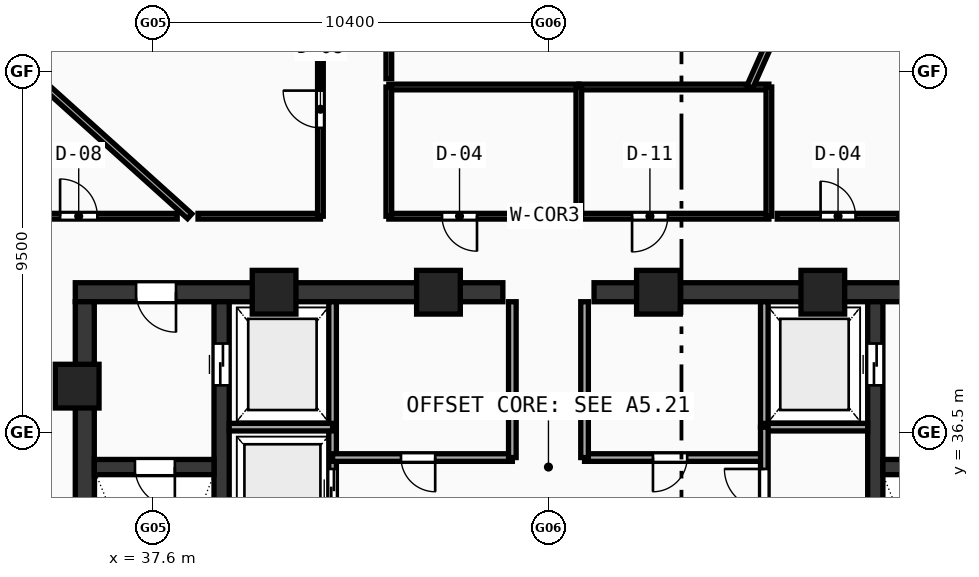
"""IFC4 building model, lengths in metres.
Left out: names, types, materials, properties, quantities, classifications, styles, units other than length and angle.
Written with IfcOpenShell. Run it as: python <this file> out.ifc"""

import sys

from ifc_helpers import new_model, si_unit, direction, frame, frame_2d, origin, origin_with_axes, origin_2d, place, context, subcontext, project, spatial, rectangle, hollow_rectangle, extrude, source, transform, mapped, element, fill, save


model = new_model("IFC4")
c1 = context("Model", 3, precision=1e-05, world=origin(), true_north=direction((0.0, 1.0)))
c2 = subcontext(c1, "Body", "Model", "MODEL_VIEW")
j1 = project(units=[si_unit("LENGTHUNIT", "METRE"), si_unit("PLANEANGLEUNIT", "RADIAN")], contexts=[c1])
p1 = place(None, origin())
s1 = spatial("IfcSite", under=j1, at=p1, CompositionType="ELEMENT")
p2 = place(p1, origin())
s2 = spatial("IfcBuilding", under=s1, at=p2, CompositionType="ELEMENT")
p3 = place(p2, frame((0.0, 0.0, 336.76)))
s3 = spatial("IfcBuildingStorey", under=s2, at=p3, CompositionType="ELEMENT", Elevation=336.76)
p4 = place(p3, frame((35.55, 40.2, 0.0), z_axis=(0.0, 0.0, 1.0), x_axis=(1.0, 0.0, 0.0)))
e1 = element("IfcWall", 1, at=p4, inside=s3, PredefinedType="SHEAR", context=c2, shape_type="SweptSolid", body=[
    extrude(rectangle(XDim=11.25, YDim=0.5, at=frame_2d((5.625, 0.0))), origin(), (0.0, 0.0, 1.0), 3.49),
])
p5 = place(p4, frame((1.6, 0.0, 0.0)))
e2 = element("IfcOpeningElement", 2, at=p5, cuts=e1, PredefinedType="OPENING", context=c2, shape_type="SweptSolid", body=[
    extrude(rectangle(XDim=1.05, YDim=2.1, at=frame_2d((0.525, 1.05))), frame((0.0, 0.26, 0.0), z_axis=(0.0, -1.0, 0.0), x_axis=(1.0, 0.0, 0.0)), (0.0, 0.0, 1.0), 0.52),
])
p6 = place(p3, frame((49.2, 40.2, 0.0), z_axis=(0.0, 0.0, 1.0), x_axis=(1.0, 0.0, 0.0)))
e3 = element("IfcWall", 3, at=p6, inside=s3, PredefinedType="SHEAR", context=c2, shape_type="SweptSolid", body=[
    extrude(rectangle(XDim=11.25, YDim=0.5, at=frame_2d((5.625, 0.0))), origin(), (0.0, 0.0, 1.0), 3.49),
])
p7 = place(p6, frame((8.6, 0.0, 0.0)))
e4 = element("IfcOpeningElement", 4, at=p7, cuts=e3, PredefinedType="OPENING", context=c2, shape_type="SweptSolid", body=[
    extrude(rectangle(XDim=1.05, YDim=2.1, at=frame_2d((0.525, 1.05))), frame((0.0, 0.26, 0.0), z_axis=(0.0, -1.0, 0.0), x_axis=(1.0, 0.0, 0.0)), (0.0, 0.0, 1.0), 0.52),
])
p8 = place(p3, frame((35.8, 27.75, 0.0), z_axis=(0.0, 0.0, 1.0), x_axis=(0.0, 1.0, 0.0)))
e5 = element("IfcWall", 5, at=p8, inside=s3, PredefinedType="SHEAR", context=c2, shape_type="SweptSolid", body=[
    extrude(rectangle(XDim=12.2, YDim=0.5, at=frame_2d((6.1, 0.0))), origin(), (0.0, 0.0, 1.0), 3.49),
])
p9 = place(p3, frame((39.4, 27.75, 0.0), z_axis=(0.0, 0.0, 1.0), x_axis=(0.0, 1.0, 0.0)))
e6 = element("IfcWall", 6, at=p9, inside=s3, PredefinedType="SHEAR", context=c2, shape_type="SweptSolid", body=[
    extrude(rectangle(XDim=12.2, YDim=0.4, at=frame_2d((6.1, 0.0))), origin(), (0.0, 0.0, 1.0), 3.49),
])
p10 = place(p9, frame((10.0, 0.0, 0.0)))
e7 = element("IfcOpeningElement", 7, at=p10, cuts=e6, PredefinedType="OPENING", context=c2, shape_type="SweptSolid", body=[
    extrude(rectangle(XDim=1.1, YDim=2.1, at=frame_2d((0.55, 1.05))), frame((0.0, 0.21, 0.0), z_axis=(0.0, -1.0, 0.0), x_axis=(1.0, 0.0, 0.0)), (0.0, 0.0, 1.0), 0.42),
])
p11 = place(p3, frame((56.6, 27.75, 0.0), z_axis=(0.0, 0.0, 1.0), x_axis=(0.0, 1.0, 0.0)))
e8 = element("IfcWall", 8, at=p11, inside=s3, PredefinedType="SHEAR", context=c2, shape_type="SweptSolid", body=[
    extrude(rectangle(XDim=12.2, YDim=0.4, at=frame_2d((6.1, 0.0))), origin(), (0.0, 0.0, 1.0), 3.49),
])
p12 = place(p11, frame((10.0, 0.0, 0.0)))
e9 = element("IfcOpeningElement", 9, at=p12, cuts=e8, PredefinedType="OPENING", context=c2, shape_type="SweptSolid", body=[
    extrude(rectangle(XDim=1.1, YDim=2.1, at=frame_2d((0.55, 1.05))), frame((0.0, 0.21, 0.0), z_axis=(0.0, -1.0, 0.0), x_axis=(1.0, 0.0, 0.0)), (0.0, 0.0, 1.0), 0.42),
])
p13 = place(p3, frame((36.05, 35.6, 0.0), z_axis=(0.0, 0.0, 1.0), x_axis=(1.0, 0.0, 0.0)))
e10 = element("IfcWall", 10, at=p13, inside=s3, PredefinedType="SHEAR", context=c2, shape_type="SweptSolid", body=[
    extrude(rectangle(XDim=3.15, YDim=0.4, at=frame_2d((1.575, 0.0))), origin(), (0.0, 0.0, 1.0), 3.49),
])
p14 = place(p13, frame((1.07, 0.0, 0.0)))
e11 = element("IfcOpeningElement", 11, at=p14, cuts=e10, PredefinedType="OPENING", context=c2, shape_type="SweptSolid", body=[
    extrude(rectangle(XDim=1.05, YDim=2.1, at=frame_2d((0.525, 1.05))), frame((0.0, 0.21, 0.0), z_axis=(0.0, -1.0, 0.0), x_axis=(1.0, 0.0, 0.0)), (0.0, 0.0, 1.0), 0.42),
])
p15 = place(p3, frame((56.8, 35.6, 0.0), z_axis=(0.0, 0.0, 1.0), x_axis=(1.0, 0.0, 0.0)))
e12 = element("IfcWall", 12, at=p15, inside=s3, PredefinedType="SHEAR", context=c2, shape_type="SweptSolid", body=[
    extrude(rectangle(XDim=3.15, YDim=0.4, at=frame_2d((1.575, 0.0))), origin(), (0.0, 0.0, 1.0), 3.49),
])
p16 = place(p15, frame((1.02, 0.0, 0.0)))
e13 = element("IfcOpeningElement", 13, at=p16, cuts=e12, PredefinedType="OPENING", context=c2, shape_type="SweptSolid", body=[
    extrude(rectangle(XDim=1.05, YDim=2.1, at=frame_2d((0.525, 1.05))), frame((0.0, 0.21, 0.0), z_axis=(0.0, -1.0, 0.0), x_axis=(1.0, 0.0, 0.0)), (0.0, 0.0, 1.0), 0.42),
])
m1 = source(origin(), c2, "Body", "SweptSolid", [
    extrude(hollow_rectangle(XDim=1.15, YDim=1.15, WallThickness=0.048, at=origin_2d()), origin(), (0.0, 0.0, 1.0), 3.75),
])
for number, where, z_axis, x_axis in (
    (14, (55.219, 40.2, -0.26), (0.0, 0.0, 1.0), (1.0, 0.0, 0.0)),
    (15, (50.894, 40.2, -0.26), (0.0, 0.0, 1.0), (1.0, 0.0, 0.0)),
    (16, (45.106, 40.2, -0.26), (0.0, 0.0, 1.0), (1.0, 0.0, 0.0)),
    (17, (40.781, 40.2, -0.26), (0.0, 0.0, 1.0), (1.0, 0.0, 0.0)),
    (18, (35.6, 37.729, -0.26), (0.0, 0.0, 1.0), (1.0, 0.0, 0.0)),
):
    element("IfcColumn", number, at=place(p3, frame(where, z_axis=z_axis, x_axis=x_axis)), inside=s3, PredefinedType="COLUMN", context=c2, shape_type="MappedRepresentation", body=[
        mapped(m1, transform((0.0, 0.0, 0.0), scale=1.0)),
    ])
p17 = place(p3, frame((42.32, 33.5, 0.0), z_axis=(0.0, 0.0, 1.0), x_axis=(0.0, 1.0, 0.0)))
e19 = element("IfcWall", 19, at=p17, inside=s3, PredefinedType="SOLIDWALL", context=c2, shape_type="SweptSolid", body=[
    extrude(rectangle(XDim=6.45, YDim=0.2, at=frame_2d((3.225, 0.0))), origin(), (0.0, 0.0, 1.0), 3.49),
])
p18 = place(p17, frame((1.0, 0.0, 0.0)))
e20 = element("IfcOpeningElement", 20, at=p18, cuts=e19, PredefinedType="OPENING", context=c2, shape_type="SweptSolid", body=[
    extrude(rectangle(XDim=1.05, YDim=2.1, at=frame_2d((0.525, 1.05))), frame((0.0, 0.11, 0.0), z_axis=(0.0, -1.0, 0.0), x_axis=(1.0, 0.0, 0.0)), (0.0, 0.0, 1.0), 0.22),
])
p19 = place(p3, frame((39.6, 36.65, 0.0), z_axis=(0.0, 0.0, 1.0), x_axis=(1.0, 0.0, 0.0)))
e21 = element("IfcWall", 21, at=p19, inside=s3, PredefinedType="SOLIDWALL", context=c2, shape_type="SweptSolid", body=[
    extrude(rectangle(XDim=2.72, YDim=0.2, at=frame_2d((1.36, 0.0))), origin(), (0.0, 0.0, 1.0), 3.49),
])
p20 = place(p3, frame((53.68, 36.65, 0.0), z_axis=(0.0, 0.0, 1.0), x_axis=(0.0, 1.0, 0.0)))
e22 = element("IfcWall", 22, at=p20, inside=s3, PredefinedType="SOLIDWALL", context=c2, shape_type="SweptSolid", body=[
    extrude(rectangle(XDim=3.3, YDim=0.2, at=frame_2d((1.65, 0.0))), origin(), (0.0, 0.0, 1.0), 3.49),
])
p21 = place(p3, frame((53.68, 36.65, 0.0), z_axis=(0.0, 0.0, 1.0), x_axis=(1.0, 0.0, 0.0)))
e23 = element("IfcWall", 23, at=p21, inside=s3, PredefinedType="SOLIDWALL", context=c2, shape_type="SweptSolid", body=[
    extrude(rectangle(XDim=2.72, YDim=0.2, at=frame_2d((1.36, 0.0))), origin(), (0.0, 0.0, 1.0), 3.49),
])
p22 = place(p3, frame((42.32, 35.85, 0.0), z_axis=(0.0, 0.0, 1.0), x_axis=(1.0, 0.0, 0.0)))
e24 = element("IfcWall", 24, at=p22, inside=s3, PredefinedType="SOLIDWALL", context=c2, shape_type="SweptSolid", body=[
    extrude(rectangle(XDim=4.73, YDim=0.2, at=frame_2d((2.365, 0.0))), origin(), (0.0, 0.0, 1.0), 3.49),
])
p23 = place(p22, frame((1.8, 0.0, 0.0)))
e25 = element("IfcOpeningElement", 25, at=p23, cuts=e24, PredefinedType="OPENING", context=c2, shape_type="SweptSolid", body=[
    extrude(rectangle(XDim=0.9, YDim=2.1, at=frame_2d((0.45, 1.05))), frame((0.0, 0.11, 0.0), z_axis=(0.0, -1.0, 0.0), x_axis=(1.0, 0.0, 0.0)), (0.0, 0.0, 1.0), 0.22),
])
p24 = place(p3, frame((48.95, 35.85, 0.0), z_axis=(0.0, 0.0, 1.0), x_axis=(1.0, 0.0, 0.0)))
e26 = element("IfcWall", 26, at=p24, inside=s3, PredefinedType="SOLIDWALL", context=c2, shape_type="SweptSolid", body=[
    extrude(rectangle(XDim=4.73, YDim=0.2, at=frame_2d((2.365, 0.0))), origin(), (0.0, 0.0, 1.0), 3.49),
])
p25 = place(p24, frame((1.8, 0.0, 0.0)))
e27 = element("IfcOpeningElement", 27, at=p25, cuts=e26, PredefinedType="OPENING", context=c2, shape_type="SweptSolid", body=[
    extrude(rectangle(XDim=0.9, YDim=2.1, at=frame_2d((0.45, 1.05))), frame((0.0, 0.11, 0.0), z_axis=(0.0, -1.0, 0.0), x_axis=(1.0, 0.0, 0.0)), (0.0, 0.0, 1.0), 0.22),
])
for number, where, z_axis, x_axis in (
    (28, (47.05, 35.85, 0.0), (0.0, 0.0, 1.0), (0.0, 1.0, 0.0)),
    (29, (48.95, 35.85, 0.0), (0.0, 0.0, 1.0), (0.0, 1.0, 0.0)),
):
    element("IfcWall", number, at=place(p3, frame(where, z_axis=z_axis, x_axis=x_axis)), inside=s3, PredefinedType="SOLIDWALL", context=c2, shape_type="SweptSolid", body=[
        extrude(rectangle(XDim=4.1, YDim=0.2, at=frame_2d((2.05, 0.0))), origin(), (0.0, 0.0, 1.0), 3.49),
    ])
p26 = place(p3, frame((53.68, 27.6, 0.0), z_axis=(0.0, 0.0, 1.0), x_axis=(0.0, 1.0, 0.0)))
e30 = element("IfcWall", 30, at=p26, inside=s3, PredefinedType="SOLIDWALL", context=c2, shape_type="SweptSolid", body=[
    extrude(rectangle(XDim=9.05, YDim=0.2, at=frame_2d((4.525, 0.0))), origin(), (0.0, 0.0, 1.0), 3.49),
])
p27 = place(p26, frame((6.9, 0.0, 0.0)))
e31 = element("IfcOpeningElement", 31, at=p27, cuts=e30, PredefinedType="OPENING", context=c2, shape_type="SweptSolid", body=[
    extrude(rectangle(XDim=1.05, YDim=2.1, at=frame_2d((0.525, 1.05))), frame((0.0, 0.11, 0.0), z_axis=(0.0, -1.0, 0.0), x_axis=(1.0, 0.0, 0.0)), (0.0, 0.0, 1.0), 0.22),
])
p28 = place(p3, frame((43.8, 42.2, 0.0), z_axis=(0.0, 0.0, 1.0), x_axis=(1.0, 0.0, 0.0)))
e32 = element("IfcWall", 32, at=p28, inside=s3, PredefinedType="PARTITIONING", context=c2, shape_type="SweptSolid", body=[
    extrude(rectangle(XDim=5.0, YDim=0.15, at=frame_2d((2.5, 0.0))), origin(), (0.0, 0.0, 1.0), 2.89),
])
p29 = place(p28, frame((1.4, 0.0, 0.0)))
e33 = element("IfcOpeningElement", 33, at=p29, cuts=e32, PredefinedType="OPENING", context=c2, shape_type="SweptSolid", body=[
    extrude(rectangle(XDim=0.92, YDim=2.1, at=frame_2d((0.46, 1.05))), frame((0.0, 0.085, 0.0), z_axis=(0.0, -1.0, 0.0), x_axis=(1.0, 0.0, 0.0)), (0.0, 0.0, 1.0), 0.17),
])
p30 = place(p3, frame((43.8, 45.6, 0.0), z_axis=(0.0, 0.0, 1.0), x_axis=(1.0, 0.0, 0.0)))
e34 = element("IfcWall", 34, at=p30, inside=s3, PredefinedType="PARTITIONING", context=c2, shape_type="SweptSolid", body=[
    extrude(rectangle(XDim=5.0, YDim=0.15, at=frame_2d((2.5, 0.0))), origin(), (0.0, 0.0, 1.0), 3.49),
])
p31 = place(p3, frame((43.8, 42.2, 0.0), z_axis=(0.0, 0.0, 1.0), x_axis=(0.0, 1.0, 0.0)))
e35 = element("IfcWall", 35, at=p31, inside=s3, PredefinedType="PARTITIONING", context=c2, shape_type="SweptSolid", body=[
    extrude(rectangle(XDim=3.4, YDim=0.15, at=frame_2d((1.7, 0.0))), origin(), (0.0, 0.0, 1.0), 2.89),
])
p32 = place(p3, frame((48.8, 42.2, 0.0), z_axis=(0.0, 0.0, 1.0), x_axis=(1.0, 0.0, 0.0)))
e36 = element("IfcWall", 36, at=p32, inside=s3, PredefinedType="PARTITIONING", context=c2, shape_type="SweptSolid", body=[
    extrude(rectangle(XDim=5.0, YDim=0.15, at=frame_2d((2.5, 0.0))), origin(), (0.0, 0.0, 1.0), 2.89),
])
p33 = place(p32, frame((1.4, 0.0, 0.0)))
e37 = element("IfcOpeningElement", 37, at=p33, cuts=e36, PredefinedType="OPENING", context=c2, shape_type="SweptSolid", body=[
    extrude(rectangle(XDim=0.94, YDim=2.1, at=frame_2d((0.47, 1.05))), frame((0.0, 0.085, 0.0), z_axis=(0.0, -1.0, 0.0), x_axis=(1.0, 0.0, 0.0)), (0.0, 0.0, 1.0), 0.17),
])
p34 = place(p3, frame((48.8, 45.6, 0.0), z_axis=(0.0, 0.0, 1.0), x_axis=(1.0, 0.0, 0.0)))
e38 = element("IfcWall", 38, at=p34, inside=s3, PredefinedType="PARTITIONING", context=c2, shape_type="SweptSolid", body=[
    extrude(rectangle(XDim=5.0, YDim=0.15, at=frame_2d((2.5, 0.0))), origin(), (0.0, 0.0, 1.0), 2.89),
])
for number, where, z_axis, x_axis in (
    (39, (48.8, 42.2, 0.0), (0.0, 0.0, 1.0), (0.0, 1.0, 0.0)),
    (40, (53.8, 42.2, 0.0), (0.0, 0.0, 1.0), (0.0, 1.0, 0.0)),
):
    element("IfcWall", number, at=place(p3, frame(where, z_axis=z_axis, x_axis=x_axis)), inside=s3, PredefinedType="PARTITIONING", context=c2, shape_type="SweptSolid", body=[
        extrude(rectangle(XDim=3.4, YDim=0.15, at=frame_2d((1.7, 0.0))), origin(), (0.0, 0.0, 1.0), 3.49),
    ])
p35 = place(p3, frame((53.298, 45.6, 0.0), z_axis=(0.0, 0.0, 1.0), x_axis=(0.40675009841, 0.913539466823, 0.0)))
e41 = element("IfcWall", 41, at=p35, inside=s3, PredefinedType="PARTITIONING", context=c2, shape_type="SweptSolid", body=[
    extrude(rectangle(XDim=16.219, YDim=0.17, at=frame_2d((8.11, 0.0))), origin(), (0.0, 0.0, 1.0), 2.89),
])
p36 = place(p3, frame((38.56, 42.2, 0.0), z_axis=(0.0, 0.0, 1.0), x_axis=(-0.743141978473, 0.669133768264, 0.0)))
e42 = element("IfcWall", 42, at=p36, inside=s3, PredefinedType="PARTITIONING", context=c2, shape_type="SweptSolid", body=[
    extrude(rectangle(XDim=11.968, YDim=0.17, at=frame_2d((5.984, 0.0))), origin(), (0.0, 0.0, 1.0), 2.89),
])
p37 = place(p3, frame((33.15, 42.2, 0.0), z_axis=(0.0, 0.0, 1.0), x_axis=(1.0, 0.0, 0.0)))
e43 = element("IfcWall", 43, at=p37, inside=s3, PredefinedType="PARTITIONING", context=c2, shape_type="SweptSolid", body=[
    extrude(rectangle(XDim=5.081, YDim=0.15, at=frame_2d((2.541, 0.0))), origin(), (0.0, 0.0, 1.0), 3.14),
])
p38 = place(p37, frame((2.0, 0.0, 0.0)))
e44 = element("IfcOpeningElement", 44, at=p38, cuts=e43, PredefinedType="OPENING", context=c2, shape_type="SweptSolid", body=[
    extrude(rectangle(XDim=0.98, YDim=2.12, at=frame_2d((0.49, 1.06))), frame((0.0, 0.085, 0.0), z_axis=(0.0, -1.0, 0.0), x_axis=(1.0, 0.0, 0.0)), (0.0, 0.0, 1.0), 0.17),
])
p39 = place(p3, frame((38.78, 42.2, 0.0), z_axis=(0.0, 0.0, 1.0), x_axis=(1.0, 0.0, 0.0)))
e45 = element("IfcWall", 45, at=p39, inside=s3, PredefinedType="PARTITIONING", context=c2, shape_type="SweptSolid", body=[
    extrude(rectangle(XDim=3.22, YDim=0.15, at=frame_2d((1.61, 0.0))), origin(), (0.0, 0.0, 1.0), 2.89),
])
p40 = place(p3, frame((42.0, 42.2, 0.0), z_axis=(0.0, 0.0, 1.0), x_axis=(0.0, 1.0, 0.0)))
e46 = element("IfcWall", 46, at=p40, inside=s3, PredefinedType="PARTITIONING", context=c2, shape_type="SweptSolid", body=[
    extrude(rectangle(XDim=5.6, YDim=0.15, at=frame_2d((2.8, 0.0))), origin(), (0.0, 0.0, 1.0), 2.89),
])
p41 = place(p40, frame((2.325, 0.0, 0.0)))
e47 = element("IfcOpeningElement", 47, at=p41, cuts=e46, PredefinedType="OPENING", context=c2, shape_type="SweptSolid", body=[
    extrude(rectangle(XDim=0.98, YDim=2.12, at=frame_2d((0.49, 1.06))), frame((0.0, 0.085, 0.0), z_axis=(0.0, -1.0, 0.0), x_axis=(1.0, 0.0, 0.0)), (0.0, 0.0, 1.0), 0.17),
])
p42 = place(p3, frame((43.8, 47.8, 0.0), z_axis=(0.0, 0.0, 1.0), x_axis=(0.0, -1.0, 0.0)))
e48 = element("IfcWall", 48, at=p42, inside=s3, PredefinedType="PARTITIONING", context=c2, shape_type="SweptSolid", body=[
    extrude(rectangle(XDim=1.98, YDim=0.15, at=frame_2d((0.99, 0.0))), origin(), (0.0, 0.0, 1.0), 3.14),
])
p43 = place(p3, frame((54.02, 42.2, 0.0), z_axis=(0.0, 0.0, 1.0), x_axis=(1.0, 0.0, 0.0)))
e49 = element("IfcWall", 49, at=p43, inside=s3, PredefinedType="PARTITIONING", context=c2, shape_type="SweptSolid", body=[
    extrude(rectangle(XDim=3.2, YDim=0.15, at=frame_2d((1.6, 0.0))), origin(), (0.0, 0.0, 1.0), 2.89),
])
p44 = place(p43, frame((1.14, 0.0, 0.0)))
e50 = element("IfcOpeningElement", 50, at=p44, cuts=e49, PredefinedType="OPENING", context=c2, shape_type="SweptSolid", body=[
    extrude(rectangle(XDim=0.92, YDim=2.1, at=frame_2d((0.46, 1.05))), frame((0.0, 0.085, 0.0), z_axis=(0.0, -1.0, 0.0), x_axis=(1.0, 0.0, 0.0)), (0.0, 0.0, 1.0), 0.17),
])
m2 = source(origin(), c2, "Body", "SweptSolid", [
    extrude(rectangle(XDim=1.05, YDim=2.1, at=frame_2d((0.525, 1.05))), frame((0.0, 0.025, 0.0), z_axis=(0.0, -1.0, 0.0), x_axis=(1.0, 0.0, 0.0)), (0.0, 0.0, 1.0), 0.05),
])
p45 = place(p14, frame((1.05, 0.0, 0.0), z_axis=(0.0, 0.0, 1.0), x_axis=(-1.0, 0.0, 0.0)))
e51 = element("IfcDoor", 51, at=p45, inside=s3, OperationType="SINGLE_SWING_LEFT", PredefinedType="DOOR", context=c2, shape_type="MappedRepresentation", body=[
    mapped(m2, transform((0.0, 0.0, 0.0), scale=1.0)),
])
fill(e11, e51)
p46 = place(p5, frame((1.05, 0.0, 0.0), z_axis=(0.0, 0.0, 1.0), x_axis=(-1.0, 0.0, 0.0)))
e52 = element("IfcDoor", 52, at=p46, inside=s3, OperationType="SINGLE_SWING_LEFT", PredefinedType="DOOR", context=c2, shape_type="MappedRepresentation", body=[
    mapped(m2, transform((0.0, 0.0, 0.0), scale=1.0)),
])
fill(e2, e52)
m3 = source(origin(), c2, "Body", "SweptSolid", [
    extrude(rectangle(XDim=1.1, YDim=2.1, at=frame_2d((0.55, 1.05))), frame((0.0, 0.025, 0.0), z_axis=(0.0, -1.0, 0.0), x_axis=(1.0, 0.0, 0.0)), (0.0, 0.0, 1.0), 0.05),
])
p47 = place(p10, frame((1.1, 0.0, 0.0), z_axis=(0.0, 0.0, 1.0), x_axis=(-1.0, 0.0, 0.0)))
e53 = element("IfcDoor", 53, at=p47, inside=s3, OperationType="DOUBLE_DOOR_SLIDING", PredefinedType="DOOR", context=c2, shape_type="MappedRepresentation", body=[
    mapped(m3, transform((0.0, 0.0, 0.0), scale=1.0)),
])
fill(e7, e53)
p48 = place(p12, origin_with_axes())
e54 = element("IfcDoor", 54, at=p48, inside=s3, OperationType="DOUBLE_DOOR_SLIDING", PredefinedType="DOOR", context=c2, shape_type="MappedRepresentation", body=[
    mapped(m3, transform((0.0, 0.0, 0.0), scale=1.0)),
])
fill(e9, e54)
p49 = place(p18, origin_with_axes())
e55 = element("IfcDoor", 55, at=p49, inside=s3, OperationType="DOUBLE_DOOR_SLIDING", PredefinedType="DOOR", context=c2, shape_type="MappedRepresentation", body=[
    mapped(m2, transform((0.0, 0.0, 0.0), scale=1.0)),
])
fill(e20, e55)
m4 = source(origin(), c2, "Body", "SweptSolid", [
    extrude(rectangle(XDim=0.9, YDim=2.1, at=frame_2d((0.45, 1.05))), frame((0.0, 0.025, 0.0), z_axis=(0.0, -1.0, 0.0), x_axis=(1.0, 0.0, 0.0)), (0.0, 0.0, 1.0), 0.05),
])
p50 = place(p23, frame((0.9, 0.0, 0.0), z_axis=(0.0, 0.0, 1.0), x_axis=(-1.0, 0.0, 0.0)))
e56 = element("IfcDoor", 56, at=p50, inside=s3, OperationType="SINGLE_SWING_LEFT", PredefinedType="DOOR", context=c2, shape_type="MappedRepresentation", body=[
    mapped(m4, transform((0.0, 0.0, 0.0), scale=1.0)),
])
fill(e25, e56)
p51 = place(p25, frame((0.9, 0.0, 0.0), z_axis=(0.0, 0.0, 1.0), x_axis=(-1.0, 0.0, 0.0)))
e57 = element("IfcDoor", 57, at=p51, inside=s3, OperationType="SINGLE_SWING_RIGHT", PredefinedType="DOOR", context=c2, shape_type="MappedRepresentation", body=[
    mapped(m4, transform((0.0, 0.0, 0.0), scale=1.0)),
])
fill(e27, e57)
p52 = place(p27, origin_with_axes())
e58 = element("IfcDoor", 58, at=p52, inside=s3, OperationType="SINGLE_SWING_RIGHT", PredefinedType="DOOR", context=c2, shape_type="MappedRepresentation", body=[
    mapped(m2, transform((0.0, 0.0, 0.0), scale=1.0)),
])
fill(e31, e58)
m5 = source(origin(), c2, "Body", "SweptSolid", [
    extrude(rectangle(XDim=0.92, YDim=2.1, at=frame_2d((0.46, 1.05))), frame((0.0, 0.025, 0.0), z_axis=(0.0, -1.0, 0.0), x_axis=(1.0, 0.0, 0.0)), (0.0, 0.0, 1.0), 0.05),
])
p53 = place(p29, frame((0.92, 0.0, 0.0), z_axis=(0.0, 0.0, 1.0), x_axis=(-1.0, 0.0, 0.0)))
e59 = element("IfcDoor", 59, at=p53, inside=s3, OperationType="SINGLE_SWING_LEFT", PredefinedType="DOOR", context=c2, shape_type="MappedRepresentation", body=[
    mapped(m5, transform((0.0, 0.0, 0.0), scale=1.0)),
])
fill(e33, e59)
m6 = source(origin(), c2, "Body", "SweptSolid", [
    extrude(rectangle(XDim=0.94, YDim=2.1, at=frame_2d((0.47, 1.05))), frame((0.0, 0.025, 0.0), z_axis=(0.0, -1.0, 0.0), x_axis=(1.0, 0.0, 0.0)), (0.0, 0.0, 1.0), 0.05),
])
p54 = place(p33, frame((0.94, 0.0, 0.0), z_axis=(0.0, 0.0, 1.0), x_axis=(-1.0, 0.0, 0.0)))
e60 = element("IfcDoor", 60, at=p54, inside=s3, OperationType="SINGLE_SWING_RIGHT", PredefinedType="DOOR", context=c2, shape_type="MappedRepresentation", body=[
    mapped(m6, transform((0.0, 0.0, 0.0), scale=1.0)),
])
fill(e37, e60)
p55 = place(p44, origin_with_axes())
e61 = element("IfcDoor", 61, at=p55, inside=s3, OperationType="SINGLE_SWING_LEFT", PredefinedType="DOOR", context=c2, shape_type="MappedRepresentation", body=[
    mapped(m5, transform((0.0, 0.0, 0.0), scale=1.0)),
])
fill(e50, e61)
m7 = source(origin(), c2, "Body", "SweptSolid", [
    extrude(rectangle(XDim=0.98, YDim=2.12, at=frame_2d((0.49, 1.06))), frame((0.0, 0.025, 0.0), z_axis=(0.0, -1.0, 0.0), x_axis=(1.0, 0.0, 0.0)), (0.0, 0.0, 1.0), 0.05),
])
p56 = place(p41, origin_with_axes())
e62 = element("IfcDoor", 62, at=p56, inside=s3, OperationType="SINGLE_SWING_RIGHT", PredefinedType="DOOR", context=c2, shape_type="MappedRepresentation", body=[
    mapped(m7, transform((0.0, 0.0, 0.0), scale=1.0)),
])
fill(e47, e62)
p57 = place(p38, origin_with_axes())
e63 = element("IfcDoor", 63, at=p57, inside=s3, OperationType="SINGLE_SWING_LEFT", PredefinedType="DOOR", context=c2, shape_type="MappedRepresentation", body=[
    mapped(m7, transform((0.0, 0.0, 0.0), scale=1.0)),
])
fill(e44, e63)
save(model, sys.argv[1])
